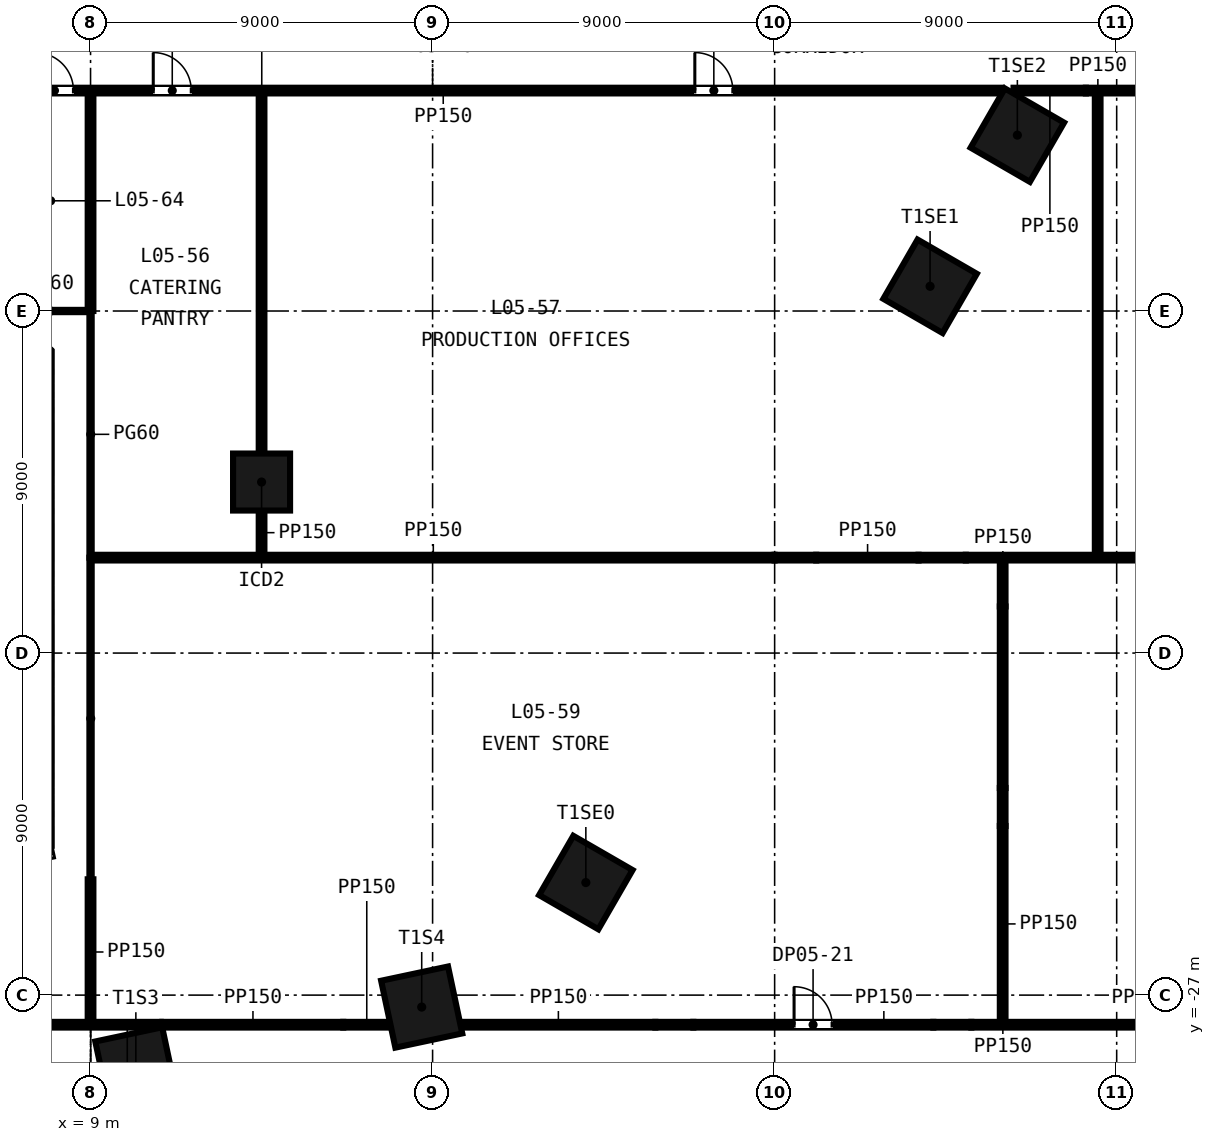
"""IFC4 building model, lengths in metres.
Left out: names, types, materials, properties, quantities, classifications, styles, units other than length and angle.
Written with IfcOpenShell. Run it as: python <this file> out.ifc"""

import sys

from ifc_helpers import new_model, si_unit, direction, frame, frame_2d, origin, origin_2d, place, context, subcontext, project, spatial, rectangle, extrude, element, fill, save


model = new_model("IFC4")
c1 = context("Model", 3, precision=1e-05, world=origin(), true_north=direction((0.0, 1.0)))
c2 = subcontext(c1, "Body", "Model", "MODEL_VIEW")
j1 = project(units=[si_unit("LENGTHUNIT", "METRE"), si_unit("PLANEANGLEUNIT", "RADIAN")], contexts=[c1])
p1 = place(None, origin())
s1 = spatial("IfcSite", under=j1, at=p1, CompositionType="ELEMENT")
p2 = place(p1, origin())
s2 = spatial("IfcBuilding", under=s1, at=p2, CompositionType="ELEMENT")
p3 = place(p2, frame((0.0, 0.0, 31.5)))
s3 = spatial("IfcBuildingStorey", under=s2, at=p3, CompositionType="ELEMENT", Elevation=31.5)
for number, where, z_axis, x_axis in (
    (1, (10.192, -28.914, -0.3), (0.0, 0.0, 1.0), (0.978, 0.208, 0.0)),
    (2, (17.714, -27.315, -0.3), (0.0, 0.0, 1.0), (0.978, 0.208, 0.0)),
    (3, (22.032, -24.039, -0.3), (0.0, 0.0, 1.0), (0.5, 0.866, 0.0)),
    (4, (31.09, -8.35, -0.3), (0.0, 0.0, 1.0), (0.5, 0.866, 0.0)),
    (5, (33.387, -4.373, -0.3), (0.0, 0.0, 1.0), (0.5, 0.866, 0.0)),
):
    element("IfcColumn", number, at=place(p3, frame(where, z_axis=z_axis, x_axis=x_axis)), inside=s3, PredefinedType="COLUMN", context=c2, shape_type="SweptSolid", body=[
        extrude(rectangle(XDim=1.8, YDim=1.8, at=origin_2d()), origin(), (0.0, 0.0, 1.0), 4.65),
    ])
p4 = place(p3, frame((13.5, -13.5, -0.3), z_axis=(0.0, 0.0, 1.0), x_axis=(1.0, 0.0, 0.0)))
e6 = element("IfcColumn", 6, at=p4, inside=s3, PredefinedType="COLUMN", context=c2, shape_type="SweptSolid", body=[
    extrude(rectangle(XDim=1.5, YDim=1.5, at=origin_2d()), origin(), (0.0, 0.0, 1.0), 4.65),
])
p5 = place(p3, frame((0.75, -27.779, 0.0), z_axis=(0.0, 0.0, 1.0), x_axis=(1.0, 0.0, 0.0)))
e7 = element("IfcWall", 7, at=p5, inside=s3, PredefinedType="PARTITIONING", context=c2, shape_type="SweptSolid", body=[
    extrude(rectangle(XDim=8.175, YDim=0.15, at=frame_2d((4.087, 0.0))), origin(), (0.0, 0.0, 1.0), 4.35),
])
p6 = place(p3, frame((9.075, -27.779, 0.0), z_axis=(0.0, 0.0, 1.0), x_axis=(1.0, 0.0, 0.0)))
e8 = element("IfcWall", 8, at=p6, inside=s3, PredefinedType="PARTITIONING", context=c2, shape_type="SweptSolid", body=[
    extrude(rectangle(XDim=1.773, YDim=0.15, at=frame_2d((0.886, 0.0))), origin(), (0.0, 0.0, 1.0), 4.35),
])
p7 = place(p3, frame((10.887, -27.779, 0.0), z_axis=(0.0, 0.0, 1.0), x_axis=(1.0, 0.0, 0.0)))
e9 = element("IfcWall", 9, at=p7, inside=s3, PredefinedType="PARTITIONING", context=c2, shape_type="SweptSolid", body=[
    extrude(rectangle(XDim=4.762, YDim=0.15, at=frame_2d((2.381, 0.0))), origin(), (0.0, 0.0, 1.0), 4.35),
])
p8 = place(p3, frame((15.65, -27.779, 0.0), z_axis=(0.0, 0.0, 1.0), x_axis=(1.0, 0.0, 0.0)))
e10 = element("IfcWall", 10, at=p8, inside=s3, PredefinedType="PARTITIONING", context=c2, shape_type="SweptSolid", body=[
    extrude(rectangle(XDim=1.227, YDim=0.15, at=frame_2d((0.613, 0.0))), origin(), (0.0, 0.0, 1.0), 3.5),
])
p9 = place(p3, frame((18.748, -27.779, 0.0), z_axis=(0.0, 0.0, 1.0), x_axis=(1.0, 0.0, 0.0)))
e11 = element("IfcWall", 11, at=p9, inside=s3, PredefinedType="PARTITIONING", context=c2, shape_type="SweptSolid", body=[
    extrude(rectangle(XDim=5.113, YDim=0.15, at=frame_2d((2.557, 0.0))), origin(), (0.0, 0.0, 1.0), 4.35),
])
p10 = place(p3, frame((23.862, -27.779, 0.0), z_axis=(0.0, 0.0, 1.0), x_axis=(1.0, 0.0, 0.0)))
e12 = element("IfcWall", 12, at=p10, inside=s3, PredefinedType="PARTITIONING", context=c2, shape_type="SweptSolid", body=[
    extrude(rectangle(XDim=1.0, YDim=0.15, at=frame_2d((0.5, 0.0))), origin(), (0.0, 0.0, 1.0), 3.436),
])
p11 = place(p3, frame((24.862, -27.779, 0.0), z_axis=(0.0, 0.0, 1.0), x_axis=(1.0, 0.0, 0.0)))
e13 = element("IfcWall", 13, at=p11, inside=s3, PredefinedType="PARTITIONING", context=c2, shape_type="SweptSolid", body=[
    extrude(rectangle(XDim=6.314, YDim=0.15, at=frame_2d((3.157, 0.0))), origin(), (0.0, 0.0, 1.0), 4.35),
])
p12 = place(p11, frame((2.65, 0.0, 0.0)))
e14 = element("IfcOpeningElement", 14, at=p12, cuts=e13, PredefinedType="OPENING", context=c2, shape_type="SweptSolid", body=[
    extrude(rectangle(XDim=1.0, YDim=2.1, at=frame_2d((0.5, 1.05))), frame((0.0, 0.085, 0.0), z_axis=(0.0, -1.0, 0.0), x_axis=(1.0, 0.0, 0.0)), (0.0, 0.0, 1.0), 0.17),
])
p13 = place(p3, frame((31.176, -27.779, 0.0), z_axis=(0.0, 0.0, 1.0), x_axis=(1.0, 0.0, 0.0)))
e15 = element("IfcWall", 15, at=p13, inside=s3, PredefinedType="PARTITIONING", context=c2, shape_type="SweptSolid", body=[
    extrude(rectangle(XDim=1.0, YDim=0.15, at=frame_2d((0.5, 0.0))), origin(), (0.0, 0.0, 1.0), 3.261),
])
p14 = place(p3, frame((32.176, -27.779, 0.0), z_axis=(0.0, 0.0, 1.0), x_axis=(1.0, 0.0, 0.0)))
e16 = element("IfcWall", 16, at=p14, inside=s3, PredefinedType="PARTITIONING", context=c2, shape_type="SweptSolid", body=[
    extrude(rectangle(XDim=8.898, YDim=0.15, at=frame_2d((4.449, 0.0))), origin(), (0.0, 0.0, 1.0), 4.35),
])
p15 = place(p3, frame((9.03, -15.489, 0.0), z_axis=(0.0, 0.0, 1.0), x_axis=(1.0, 0.0, 0.0)))
e17 = element("IfcWall", 17, at=p15, inside=s3, PredefinedType="PARTITIONING", context=c2, shape_type="SweptSolid", body=[
    extrude(rectangle(XDim=17.968, YDim=0.15, at=frame_2d((8.984, 0.0))), origin(), (0.0, 0.0, 1.0), 4.35),
])
p16 = place(p3, frame((26.998, -15.489, 0.0), z_axis=(0.0, 0.0, 1.0), x_axis=(1.0, 0.0, 0.0)))
e18 = element("IfcWall", 18, at=p16, inside=s3, PredefinedType="PARTITIONING", context=c2, shape_type="SweptSolid", body=[
    extrude(rectangle(XDim=1.097, YDim=0.15, at=frame_2d((0.548, 0.0))), origin(), (0.0, 0.0, 1.0), 3.5),
])
p17 = place(p3, frame((28.094, -15.489, 0.0), z_axis=(0.0, 0.0, 1.0), x_axis=(1.0, 0.0, 0.0)))
e19 = element("IfcWall", 19, at=p17, inside=s3, PredefinedType="PARTITIONING", context=c2, shape_type="SweptSolid", body=[
    extrude(rectangle(XDim=2.692, YDim=0.15, at=frame_2d((1.346, 0.0))), origin(), (0.0, 0.0, 1.0), 4.35),
])
p18 = place(p3, frame((30.787, -15.489, 0.0), z_axis=(0.0, 0.0, 1.0), x_axis=(1.0, 0.0, 0.0)))
e20 = element("IfcWall", 20, at=p18, inside=s3, PredefinedType="PARTITIONING", context=c2, shape_type="SweptSolid", body=[
    extrude(rectangle(XDim=1.244, YDim=0.15, at=frame_2d((0.622, 0.0))), origin(), (0.0, 0.0, 1.0), 3.261),
])
p19 = place(p3, frame((32.031, -15.489, 0.0), z_axis=(0.0, 0.0, 1.0), x_axis=(1.0, 0.0, 0.0)))
e21 = element("IfcWall", 21, at=p19, inside=s3, PredefinedType="PARTITIONING", context=c2, shape_type="SweptSolid", body=[
    extrude(rectangle(XDim=12.901, YDim=0.15, at=frame_2d((6.451, 0.0))), origin(), (0.0, 0.0, 1.0), 4.35),
])
p20 = place(p3, frame((6.975, -9.0, 0.0), z_axis=(0.0, 0.0, 1.0), x_axis=(1.0, 0.0, 0.0)))
e22 = element("IfcWall", 22, at=p20, inside=s3, PredefinedType="PARTITIONING", context=c2, shape_type="SweptSolid", body=[
    extrude(rectangle(XDim=1.95, YDim=0.06, at=frame_2d((0.975, 0.0))), origin(), (0.0, 0.0, 1.0), 4.35),
])
p21 = place(p3, frame((-17.925, -3.2, 0.0), z_axis=(0.0, 0.0, 1.0), x_axis=(1.0, 0.0, 0.0)))
e23 = element("IfcWall", 23, at=p21, inside=s3, PredefinedType="PARTITIONING", context=c2, shape_type="SweptSolid", body=[
    extrude(rectangle(XDim=50.906, YDim=0.15, at=frame_2d((25.453, 0.0))), origin(), (0.0, 0.0, 1.0), 4.35),
])
p22 = place(p21, frame((3.9, 0.0, 0.0)))
e24 = element("IfcOpeningElement", 24, at=p22, cuts=e23, PredefinedType="OPENING", context=c2, shape_type="SweptSolid", body=[
    extrude(rectangle(XDim=1.0, YDim=2.1, at=frame_2d((0.5, 1.05))), frame((0.0, 0.085, 0.0), z_axis=(0.0, -1.0, 0.0), x_axis=(1.0, 0.0, 0.0)), (0.0, 0.0, 1.0), 0.17),
])
p23 = place(p21, frame((28.575, 0.0, 0.0)))
e25 = element("IfcOpeningElement", 25, at=p23, cuts=e23, PredefinedType="OPENING", context=c2, shape_type="SweptSolid", body=[
    extrude(rectangle(XDim=1.0, YDim=2.1, at=frame_2d((0.5, 1.05))), frame((0.0, 0.085, 0.0), z_axis=(0.0, -1.0, 0.0), x_axis=(1.0, 0.0, 0.0)), (0.0, 0.0, 1.0), 0.17),
])
p24 = place(p21, frame((42.825, 0.0, 0.0)))
e26 = element("IfcOpeningElement", 26, at=p24, cuts=e23, PredefinedType="OPENING", context=c2, shape_type="SweptSolid", body=[
    extrude(rectangle(XDim=1.0, YDim=2.1, at=frame_2d((0.5, 1.05))), frame((0.0, 0.085, 0.0), z_axis=(0.0, -1.0, 0.0), x_axis=(1.0, 0.0, 0.0)), (0.0, 0.0, 1.0), 0.17),
])
p25 = place(p21, frame((11.575, 0.0, 0.0)))
e27 = element("IfcOpeningElement", 27, at=p25, cuts=e23, PredefinedType="OPENING", context=c2, shape_type="SweptSolid", body=[
    extrude(rectangle(XDim=1.0, YDim=2.1, at=frame_2d((0.5, 1.05))), frame((0.0, 0.085, 0.0), z_axis=(0.0, -1.0, 0.0), x_axis=(1.0, 0.0, 0.0)), (0.0, 0.0, 1.0), 0.17),
])
p26 = place(p21, frame((18.025, 0.0, 0.0)))
e28 = element("IfcOpeningElement", 28, at=p26, cuts=e23, PredefinedType="OPENING", context=c2, shape_type="SweptSolid", body=[
    extrude(rectangle(XDim=1.0, YDim=2.1, at=frame_2d((0.5, 1.05))), frame((0.0, 0.085, 0.0), z_axis=(0.0, -1.0, 0.0), x_axis=(1.0, 0.0, 0.0)), (0.0, 0.0, 1.0), 0.17),
])
p27 = place(p21, frame((22.725, 0.0, 0.0)))
e29 = element("IfcOpeningElement", 29, at=p27, cuts=e23, PredefinedType="OPENING", context=c2, shape_type="SweptSolid", body=[
    extrude(rectangle(XDim=1.0, YDim=2.1, at=frame_2d((0.5, 1.05))), frame((0.0, 0.085, 0.0), z_axis=(0.0, -1.0, 0.0), x_axis=(1.0, 0.0, 0.0)), (0.0, 0.0, 1.0), 0.17),
])
p28 = place(p21, frame((25.475, 0.0, 0.0)))
e30 = element("IfcOpeningElement", 30, at=p28, cuts=e23, PredefinedType="OPENING", context=c2, shape_type="SweptSolid", body=[
    extrude(rectangle(XDim=1.0, YDim=2.1, at=frame_2d((0.5, 1.05))), frame((0.0, 0.085, 0.0), z_axis=(0.0, -1.0, 0.0), x_axis=(1.0, 0.0, 0.0)), (0.0, 0.0, 1.0), 0.17),
])
p29 = place(p3, frame((33.286, -3.2, 0.0), z_axis=(0.0, 0.0, 1.0), x_axis=(1.0, 0.0, 0.0)))
e31 = element("IfcWall", 31, at=p29, inside=s3, PredefinedType="PARTITIONING", context=c2, shape_type="SweptSolid", body=[
    extrude(rectangle(XDim=1.904, YDim=0.15, at=frame_2d((0.952, 0.0))), origin(), (0.0, 0.0, 1.0), 3.5),
])
p30 = place(p3, frame((35.189, -3.2, 0.0), z_axis=(0.0, 0.0, 1.0), x_axis=(1.0, 0.0, 0.0)))
e32 = element("IfcWall", 32, at=p30, inside=s3, PredefinedType="PARTITIONING", context=c2, shape_type="SweptSolid", body=[
    extrude(rectangle(XDim=10.253, YDim=0.15, at=frame_2d((5.127, 0.0))), origin(), (0.0, 0.0, 1.0), 4.35),
])
p31 = place(p30, frame((4.46, 0.0, 0.0)))
e33 = element("IfcOpeningElement", 33, at=p31, cuts=e32, PredefinedType="OPENING", context=c2, shape_type="SweptSolid", body=[
    extrude(rectangle(XDim=1.8, YDim=2.4, at=frame_2d((0.9, 1.2))), frame((0.0, 0.085, 0.0), z_axis=(0.0, -1.0, 0.0), x_axis=(1.0, 0.0, 0.0)), (0.0, 0.0, 1.0), 0.17),
])
p32 = place(p3, frame((9.0, -27.778, 0.0), z_axis=(0.0, 0.0, 1.0), x_axis=(0.0, 1.0, 0.0)))
e34 = element("IfcWall", 34, at=p32, inside=s3, PredefinedType="PARTITIONING", context=c2, shape_type="SweptSolid", body=[
    extrude(rectangle(XDim=3.825, YDim=0.15, at=frame_2d((1.913, 0.0))), origin(), (0.0, 0.0, 1.0), 4.35),
])
p33 = place(p3, frame((9.0, -23.953, 0.0), z_axis=(0.0, 0.0, 1.0), x_axis=(0.0, 1.0, 0.0)))
e35 = element("IfcWall", 35, at=p33, inside=s3, PredefinedType="PARTITIONING", context=c2, shape_type="SweptSolid", body=[
    extrude(rectangle(XDim=8.462, YDim=0.06, at=frame_2d((4.231, 0.0))), origin(), (0.0, 0.0, 1.0), 4.35),
])
p34 = place(p3, frame((9.0, -15.489, 0.0), z_axis=(0.0, 0.0, 1.0), x_axis=(0.0, 1.0, 0.0)))
e36 = element("IfcWall", 36, at=p34, inside=s3, PredefinedType="PARTITIONING", context=c2, shape_type="SweptSolid", body=[
    extrude(rectangle(XDim=6.488, YDim=0.06, at=frame_2d((3.244, 0.0))), origin(), (0.0, 0.0, 1.0), 4.35),
])
p35 = place(p3, frame((9.0, -9.0, 0.0), z_axis=(0.0, 0.0, 1.0), x_axis=(0.0, 1.0, 0.0)))
e37 = element("IfcWall", 37, at=p35, inside=s3, PredefinedType="PARTITIONING", context=c2, shape_type="SweptSolid", body=[
    extrude(rectangle(XDim=5.725, YDim=0.15, at=frame_2d((2.863, 0.0))), origin(), (0.0, 0.0, 1.0), 4.35),
])
p36 = place(p3, frame((13.5, -15.414, 0.0), z_axis=(0.0, 0.0, 1.0), x_axis=(0.0, 1.0, 0.0)))
e38 = element("IfcWall", 38, at=p36, inside=s3, PredefinedType="PARTITIONING", context=c2, shape_type="SweptSolid", body=[
    extrude(rectangle(XDim=1.164, YDim=0.15, at=frame_2d((0.582, 0.0))), origin(), (0.0, 0.0, 1.0), 3.591),
])
p37 = place(p3, frame((13.5, -12.75, 0.0), z_axis=(0.0, 0.0, 1.0), x_axis=(0.0, 1.0, 0.0)))
e39 = element("IfcWall", 39, at=p37, inside=s3, PredefinedType="PARTITIONING", context=c2, shape_type="SweptSolid", body=[
    extrude(rectangle(XDim=9.475, YDim=0.15, at=frame_2d((4.738, 0.0))), origin(), (0.0, 0.0, 1.0), 3.601),
])
p38 = place(p3, frame((33.0, -27.704, 0.0), z_axis=(0.0, 0.0, 1.0), x_axis=(0.0, 1.0, 0.0)))
e40 = element("IfcWall", 40, at=p38, inside=s3, PredefinedType="PARTITIONING", context=c2, shape_type="SweptSolid", body=[
    extrude(rectangle(XDim=5.154, YDim=0.15, at=frame_2d((2.577, 0.0))), origin(), (0.0, 0.0, 1.0), 4.35),
])
p39 = place(p3, frame((33.0, -22.55, 0.0), z_axis=(0.0, 0.0, 1.0), x_axis=(0.0, 1.0, 0.0)))
e41 = element("IfcWall", 41, at=p39, inside=s3, PredefinedType="PARTITIONING", context=c2, shape_type="SweptSolid", body=[
    extrude(rectangle(XDim=1.0, YDim=0.15, at=frame_2d((0.5, 0.0))), origin(), (0.0, 0.0, 1.0), 3.261),
])
p40 = place(p3, frame((33.0, -21.55, 0.0), z_axis=(0.0, 0.0, 1.0), x_axis=(0.0, 1.0, 0.0)))
e42 = element("IfcWall", 42, at=p40, inside=s3, PredefinedType="PARTITIONING", context=c2, shape_type="SweptSolid", body=[
    extrude(rectangle(XDim=4.776, YDim=0.15, at=frame_2d((2.388, 0.0))), origin(), (0.0, 0.0, 1.0), 4.35),
])
p41 = place(p3, frame((33.0, -16.774, 0.0), z_axis=(0.0, 0.0, 1.0), x_axis=(0.0, 1.0, 0.0)))
e43 = element("IfcWall", 43, at=p41, inside=s3, PredefinedType="PARTITIONING", context=c2, shape_type="SweptSolid", body=[
    extrude(rectangle(XDim=1.21, YDim=0.15, at=frame_2d((0.605, 0.0))), origin(), (0.0, 0.0, 1.0), 3.261),
])
p42 = place(p3, frame((35.5, -15.414, 0.0), z_axis=(0.0, 0.0, 1.0), x_axis=(0.0, 1.0, 0.0)))
e44 = element("IfcWall", 44, at=p42, inside=s3, PredefinedType="PARTITIONING", context=c2, shape_type="SweptSolid", body=[
    extrude(rectangle(XDim=12.139, YDim=0.15, at=frame_2d((6.07, 0.0))), origin(), (0.0, 0.0, 1.0), 4.35),
])
p43 = place(p23, origin())
e45 = element("IfcDoor", 45, at=p43, inside=s3, OperationType="SINGLE_SWING_LEFT", PredefinedType="DOOR", context=c2, shape_type="SweptSolid", body=[
    extrude(rectangle(XDim=1.0, YDim=2.1, at=frame_2d((0.5, 1.05))), frame((0.0, 0.025, 0.0), z_axis=(0.0, -1.0, 0.0), x_axis=(1.0, 0.0, 0.0)), (0.0, 0.0, 1.0), 0.05),
])
fill(e25, e45)
p44 = place(p24, origin())
e46 = element("IfcDoor", 46, at=p44, inside=s3, OperationType="SINGLE_SWING_LEFT", PredefinedType="DOOR", context=c2, shape_type="SweptSolid", body=[
    extrude(rectangle(XDim=1.0, YDim=2.1, at=frame_2d((0.5, 1.05))), frame((0.0, 0.025, 0.0), z_axis=(0.0, -1.0, 0.0), x_axis=(1.0, 0.0, 0.0)), (0.0, 0.0, 1.0), 0.05),
])
fill(e26, e46)
p45 = place(p12, origin())
e47 = element("IfcDoor", 47, at=p45, inside=s3, OperationType="SINGLE_SWING_LEFT", PredefinedType="DOOR", context=c2, shape_type="SweptSolid", body=[
    extrude(rectangle(XDim=1.0, YDim=2.1, at=frame_2d((0.5, 1.05))), frame((0.0, 0.025, 0.0), z_axis=(0.0, -1.0, 0.0), x_axis=(1.0, 0.0, 0.0)), (0.0, 0.0, 1.0), 0.05),
])
fill(e14, e47)
p46 = place(p28, origin())
e48 = element("IfcDoor", 48, at=p46, inside=s3, OperationType="SINGLE_SWING_LEFT", PredefinedType="DOOR", context=c2, shape_type="SweptSolid", body=[
    extrude(rectangle(XDim=1.0, YDim=2.1, at=frame_2d((0.5, 1.05))), frame((0.0, 0.025, 0.0), z_axis=(0.0, -1.0, 0.0), x_axis=(1.0, 0.0, 0.0)), (0.0, 0.0, 1.0), 0.05),
])
fill(e30, e48)
save(model, sys.argv[1])
